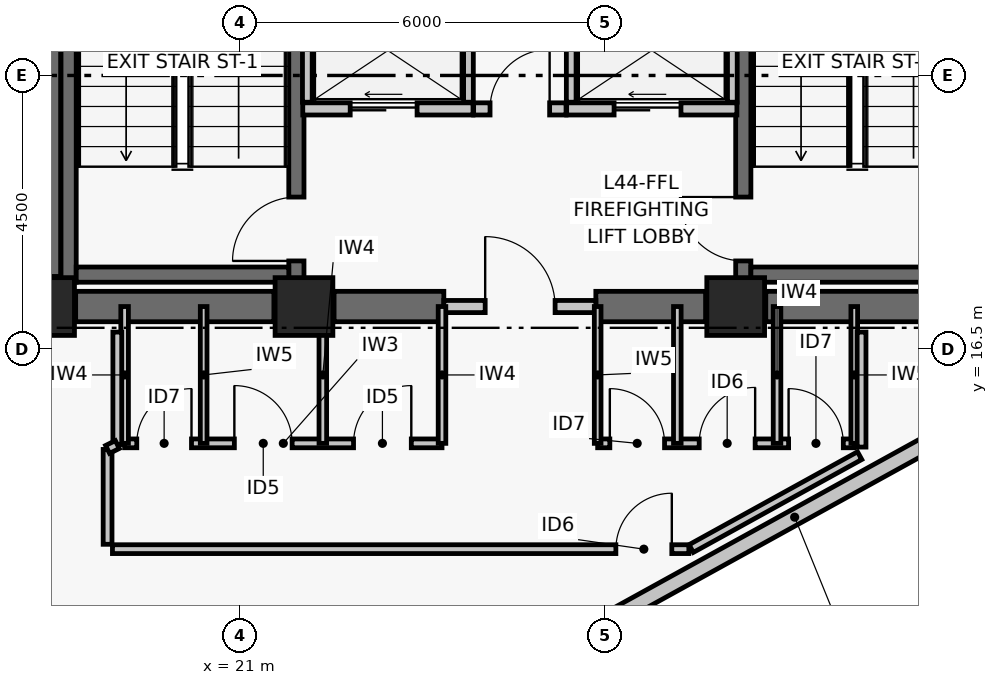
"""IFC4 building model, lengths in metres.
Left out: names, types, materials, properties, quantities, classifications, styles, units other than length and angle.
Written with IfcOpenShell. Run it as: python <this file> out.ifc"""

import sys

from ifc_helpers import new_model, si_unit, direction, frame, frame_2d, origin, origin_2d, place, context, subcontext, project, spatial, rectangle, extrude, element, fill, save


model = new_model("IFC4")
c1 = context("Model", 3, precision=1e-05, world=origin(), true_north=direction((0.0, 1.0)))
c2 = subcontext(c1, "Body", "Model", "MODEL_VIEW")
j1 = project(units=[si_unit("LENGTHUNIT", "METRE"), si_unit("PLANEANGLEUNIT", "RADIAN")], contexts=[c1])
p1 = place(None, origin())
s1 = spatial("IfcSite", under=j1, at=p1, CompositionType="ELEMENT")
p2 = place(p1, origin())
s2 = spatial("IfcBuilding", under=s1, at=p2, CompositionType="ELEMENT")
p3 = place(p2, frame((0.0, 0.0, 176.64)))
s3 = spatial("IfcBuildingStorey", under=s2, at=p3, CompositionType="ELEMENT", Elevation=176.64)
for number, where, z_axis, x_axis in (
    (1, (17.8, 17.2, 0.0), (0.0, 0.0, 1.0), (1.0, 0.0, 0.0)),
    (2, (22.05, 17.2, 0.0), (0.0, 0.0, 1.0), (1.0, 0.0, 0.0)),
    (3, (29.15, 17.2, 0.0), (0.0, 0.0, 1.0), (1.0, 0.0, 0.0)),
):
    element("IfcColumn", number, at=place(p3, frame(where, z_axis=z_axis, x_axis=x_axis)), inside=s3, PredefinedType="COLUMN", context=c2, shape_type="SweptSolid", body=[
        extrude(rectangle(XDim=0.95, YDim=0.95, at=origin_2d()), origin(), (0.0, 0.0, 1.0), 3.72),
    ])
p4 = place(p3, frame((18.295, 17.2, 0.0), z_axis=(0.0, 0.0, 1.0), x_axis=(1.0, 0.0, 0.0)))
e4 = element("IfcWall", 4, at=p4, inside=s3, PredefinedType="SHEAR", context=c2, shape_type="SweptSolid", body=[
    extrude(rectangle(XDim=3.26, YDim=0.5, at=frame_2d((1.63, 0.0))), origin(), (0.0, 0.0, 1.0), 3.5),
])
p5 = place(p3, frame((22.545, 17.2, 0.0), z_axis=(0.0, 0.0, 1.0), x_axis=(1.0, 0.0, 0.0)))
e5 = element("IfcWall", 5, at=p5, inside=s3, PredefinedType="SHEAR", context=c2, shape_type="SweptSolid", body=[
    extrude(rectangle(XDim=1.805, YDim=0.5, at=frame_2d((0.903, 0.0))), origin(), (0.0, 0.0, 1.0), 3.5),
])
p6 = place(p3, frame((26.85, 17.2, 0.0), z_axis=(0.0, 0.0, 1.0), x_axis=(1.0, 0.0, 0.0)))
e6 = element("IfcWall", 6, at=p6, inside=s3, PredefinedType="SHEAR", context=c2, shape_type="SweptSolid", body=[
    extrude(rectangle(XDim=1.805, YDim=0.5, at=frame_2d((0.902, 0.0))), origin(), (0.0, 0.0, 1.0), 3.5),
])
p7 = place(p3, frame((29.645, 17.2, 0.0), z_axis=(0.0, 0.0, 1.0), x_axis=(1.0, 0.0, 0.0)))
e7 = element("IfcWall", 7, at=p7, inside=s3, PredefinedType="SHEAR", context=c2, shape_type="SweptSolid", body=[
    extrude(rectangle(XDim=3.26, YDim=0.5, at=frame_2d((1.63, 0.0))), origin(), (0.0, 0.0, 1.0), 3.5),
])
p8 = place(p3, frame((17.8, 17.695, 0.0), z_axis=(0.0, 0.0, 1.0), x_axis=(0.0, 1.0, 0.0)))
e8 = element("IfcWall", 8, at=p8, inside=s3, PredefinedType="SHEAR", context=c2, shape_type="SweptSolid", body=[
    extrude(rectangle(XDim=8.61, YDim=0.5, at=frame_2d((4.305, 0.0))), origin(), (0.0, 0.0, 1.0), 3.5),
])
p9 = place(p3, frame((18.179, 17.6, 0.0), z_axis=(0.0, 0.0, 1.0), x_axis=(0.0, 1.0, 0.0)))
e9 = element("IfcWall", 9, at=p9, inside=s3, PredefinedType="SHEAR", context=c2, shape_type="SweptSolid", body=[
    extrude(rectangle(XDim=8.8, YDim=0.25, at=frame_2d((4.4, 0.0))), origin(), (0.0, 0.0, 1.0), 3.5),
])
p10 = place(p3, frame((21.925, 17.6, 0.0), z_axis=(0.0, 0.0, 1.0), x_axis=(0.0, 1.0, 0.0)))
e10 = element("IfcWall", 10, at=p10, inside=s3, PredefinedType="SHEAR", context=c2, shape_type="SweptSolid", body=[
    extrude(rectangle(XDim=8.8, YDim=0.25, at=frame_2d((4.4, 0.0))), origin(), (0.0, 0.0, 1.0), 3.5),
])
p11 = place(p10, frame((0.35, 0.0, 0.0)))
e11 = element("IfcOpeningElement", 11, at=p11, cuts=e10, PredefinedType="OPENING", context=c2, shape_type="SweptSolid", body=[
    extrude(rectangle(XDim=1.05, YDim=2.08, at=frame_2d((0.525, 1.04))), frame((0.0, 0.135, 0.0), z_axis=(0.0, -1.0, 0.0), x_axis=(1.0, 0.0, 0.0)), (0.0, 0.0, 1.0), 0.27),
])
p12 = place(p3, frame((18.304, 17.725, 0.0), z_axis=(0.0, 0.0, 1.0), x_axis=(1.0, 0.0, 0.0)))
e12 = element("IfcWall", 12, at=p12, inside=s3, PredefinedType="SHEAR", context=c2, shape_type="SweptSolid", body=[
    extrude(rectangle(XDim=3.496, YDim=0.25, at=frame_2d((1.748, 0.0))), origin(), (0.0, 0.0, 1.0), 3.5),
])
p13 = place(p3, frame((29.275, 17.6, 0.0), z_axis=(0.0, 0.0, 1.0), x_axis=(0.0, 1.0, 0.0)))
e13 = element("IfcWall", 13, at=p13, inside=s3, PredefinedType="SHEAR", context=c2, shape_type="SweptSolid", body=[
    extrude(rectangle(XDim=8.8, YDim=0.25, at=frame_2d((4.4, 0.0))), origin(), (0.0, 0.0, 1.0), 3.5),
])
p14 = place(p13, frame((0.35, 0.0, 0.0)))
e14 = element("IfcOpeningElement", 14, at=p14, cuts=e13, PredefinedType="OPENING", context=c2, shape_type="SweptSolid", body=[
    extrude(rectangle(XDim=1.05, YDim=2.08, at=frame_2d((0.525, 1.04))), frame((0.0, 0.135, 0.0), z_axis=(0.0, -1.0, 0.0), x_axis=(1.0, 0.0, 0.0)), (0.0, 0.0, 1.0), 0.27),
])
p15 = place(p3, frame((29.4, 17.725, 0.0), z_axis=(0.0, 0.0, 1.0), x_axis=(1.0, 0.0, 0.0)))
e15 = element("IfcWall", 15, at=p15, inside=s3, PredefinedType="SHEAR", context=c2, shape_type="SweptSolid", body=[
    extrude(rectangle(XDim=3.496, YDim=0.25, at=frame_2d((1.748, 0.0))), origin(), (0.0, 0.0, 1.0), 3.5),
])
p16 = place(p3, frame((33.195, 15.432, 0.0), z_axis=(0.0, 0.0, 1.0), x_axis=(-0.875663362897, -0.482922017389, 0.0)))
e16 = element("IfcWall", 16, at=p16, inside=s3, PredefinedType="PARTITIONING", context=c2, shape_type="SweptSolid", body=[
    extrude(rectangle(XDim=7.022, YDim=0.26, at=frame_2d((3.511, 0.0))), origin(), (0.0, 0.0, 1.0), 3.5),
])
p17 = place(p3, frame((24.35, 17.2, 0.0), z_axis=(0.0, 0.0, 1.0), x_axis=(1.0, 0.0, 0.0)))
e17 = element("IfcWall", 17, at=p17, inside=s3, PredefinedType="PARTITIONING", context=c2, shape_type="SweptSolid", body=[
    extrude(rectangle(XDim=2.5, YDim=0.2, at=frame_2d((1.25, 0.0))), origin(), (0.0, 0.0, 1.0), 2.63),
])
p18 = place(p17, frame((0.68, 0.0, 0.0)))
e18 = element("IfcOpeningElement", 18, at=p18, cuts=e17, PredefinedType="OPENING", context=c2, shape_type="SweptSolid", body=[
    extrude(rectangle(XDim=1.15, YDim=2.08, at=frame_2d((0.575, 1.04))), frame((0.0, 0.11, 0.0), z_axis=(0.0, -1.0, 0.0), x_axis=(1.0, 0.0, 0.0)), (0.0, 0.0, 1.0), 0.22),
])
p19 = place(p3, frame((24.84, 20.45, 0.0), z_axis=(0.0, 0.0, 1.0), x_axis=(1.0, 0.0, 0.0)))
e19 = element("IfcWall", 19, at=p19, inside=s3, PredefinedType="PARTITIONING", context=c2, shape_type="SweptSolid", body=[
    extrude(rectangle(XDim=1.52, YDim=0.2, at=frame_2d((0.76, 0.0))), origin(), (0.0, 0.0, 1.0), 3.5),
])
p20 = place(p19, frame((0.27, 0.0, 0.0)))
e20 = element("IfcOpeningElement", 20, at=p20, cuts=e19, PredefinedType="OPENING", context=c2, shape_type="SweptSolid", body=[
    extrude(rectangle(XDim=0.98, YDim=2.06, at=frame_2d((0.49, 1.03))), frame((0.0, 0.11, 0.0), z_axis=(0.0, -1.0, 0.0), x_axis=(1.0, 0.0, 0.0)), (0.0, 0.0, 1.0), 0.22),
])
p21 = place(p3, frame((22.03, 20.45, 0.0), z_axis=(0.0, 0.0, 1.0), x_axis=(1.0, 0.0, 0.0)))
e21 = element("IfcWall", 21, at=p21, inside=s3, PredefinedType="PARTITIONING", context=c2, shape_type="SweptSolid", body=[
    extrude(rectangle(XDim=2.8, YDim=0.2, at=frame_2d((1.4, 0.0))), origin(), (0.0, 0.0, 1.0), 3.5),
])
p22 = place(p21, frame((0.78, 0.0, 0.0)))
e22 = element("IfcOpeningElement", 22, at=p22, cuts=e21, PredefinedType="OPENING", context=c2, shape_type="SweptSolid", body=[
    extrude(rectangle(XDim=1.1, YDim=2.08, at=frame_2d((0.55, 1.04))), frame((0.0, 0.11, 0.0), z_axis=(0.0, -1.0, 0.0), x_axis=(1.0, 0.0, 0.0)), (0.0, 0.0, 1.0), 0.22),
])
p23 = place(p3, frame((26.37, 20.45, 0.0), z_axis=(0.0, 0.0, 1.0), x_axis=(1.0, 0.0, 0.0)))
e23 = element("IfcWall", 23, at=p23, inside=s3, PredefinedType="PARTITIONING", context=c2, shape_type="SweptSolid", body=[
    extrude(rectangle(XDim=2.8, YDim=0.2, at=frame_2d((1.4, 0.0))), origin(), (0.0, 0.0, 1.0), 3.5),
])
p24 = place(p23, frame((0.78, 0.0, 0.0)))
e24 = element("IfcOpeningElement", 24, at=p24, cuts=e23, PredefinedType="OPENING", context=c2, shape_type="SweptSolid", body=[
    extrude(rectangle(XDim=1.1, YDim=2.08, at=frame_2d((0.55, 1.04))), frame((0.0, 0.11, 0.0), z_axis=(0.0, -1.0, 0.0), x_axis=(1.0, 0.0, 0.0)), (0.0, 0.0, 1.0), 0.22),
])
for number, where, z_axis, x_axis in (
    (25, (22.105, 20.56, 0.0), (0.0, 0.0, 1.0), (0.0, 1.0, 0.0)),
    (26, (24.755, 20.56, 0.0), (0.0, 0.0, 1.0), (0.0, 1.0, 0.0)),
):
    element("IfcWall", number, at=place(p3, frame(where, z_axis=z_axis, x_axis=x_axis)), inside=s3, PredefinedType="PARTITIONING", context=c2, shape_type="SweptSolid", body=[
        extrude(rectangle(XDim=1.71, YDim=0.16, at=frame_2d((0.855, 0.0))), origin(), (0.0, 0.0, 1.0), 3.5),
    ])
p25 = place(p3, frame((29.095, 20.56, 0.0), z_axis=(0.0, 0.0, 1.0), x_axis=(0.0, 1.0, 0.0)))
e27 = element("IfcWall", 27, at=p25, inside=s3, PredefinedType="PARTITIONING", context=c2, shape_type="SweptSolid", body=[
    extrude(rectangle(XDim=5.45, YDim=0.16, at=frame_2d((2.725, 0.0))), origin(), (0.0, 0.0, 1.0), 3.5),
])
p26 = place(p3, frame((26.445, 20.56, 0.0), z_axis=(0.0, 0.0, 1.0), x_axis=(0.0, 1.0, 0.0)))
e28 = element("IfcWall", 28, at=p26, inside=s3, PredefinedType="PARTITIONING", context=c2, shape_type="SweptSolid", body=[
    extrude(rectangle(XDim=1.71, YDim=0.16, at=frame_2d((0.855, 0.0))), origin(), (0.0, 0.0, 1.0), 3.5),
])
p27 = place(p3, frame((19.1, 14.95, 0.0), z_axis=(0.0, 0.0, 1.0), x_axis=(1.0, 0.0, 0.0)))
e29 = element("IfcWall", 29, at=p27, inside=s3, PredefinedType="PARTITIONING", context=c2, shape_type="SweptSolid", body=[
    extrude(rectangle(XDim=5.22, YDim=0.145, at=frame_2d((2.61, 0.0))), origin(), (0.0, 0.0, 1.0), 2.73),
])
p28 = place(p27, frame((0.2, 0.0, 0.0)))
e30 = element("IfcOpeningElement", 30, at=p28, cuts=e29, PredefinedType="OPENING", context=c2, shape_type="SweptSolid", body=[
    extrude(rectangle(XDim=0.9, YDim=2.02, at=frame_2d((0.45, 1.01))), frame((0.0, 0.083, 0.0), z_axis=(0.0, -1.0, 0.0), x_axis=(1.0, 0.0, 0.0)), (0.0, 0.0, 1.0), 0.165),
])
p29 = place(p27, frame((1.805, 0.0, 0.0)))
e31 = element("IfcOpeningElement", 31, at=p29, cuts=e29, PredefinedType="OPENING", context=c2, shape_type="SweptSolid", body=[
    extrude(rectangle(XDim=0.95, YDim=2.06, at=frame_2d((0.475, 1.03))), frame((0.0, 0.083, 0.0), z_axis=(0.0, -1.0, 0.0), x_axis=(1.0, 0.0, 0.0)), (0.0, 0.0, 1.0), 0.165),
])
p30 = place(p27, frame((3.765, 0.0, 0.0)))
e32 = element("IfcOpeningElement", 32, at=p30, cuts=e29, PredefinedType="OPENING", context=c2, shape_type="SweptSolid", body=[
    extrude(rectangle(XDim=0.95, YDim=2.06, at=frame_2d((0.475, 1.03))), frame((0.0, 0.083, 0.0), z_axis=(0.0, -1.0, 0.0), x_axis=(1.0, 0.0, 0.0)), (0.0, 0.0, 1.0), 0.165),
])
p31 = place(p3, frame((26.88, 14.95, 0.0), z_axis=(0.0, 0.0, 1.0), x_axis=(1.0, 0.0, 0.0)))
e33 = element("IfcWall", 33, at=p31, inside=s3, PredefinedType="PARTITIONING", context=c2, shape_type="SweptSolid", body=[
    extrude(rectangle(XDim=4.22, YDim=0.145, at=frame_2d((2.11, 0.0))), origin(), (0.0, 0.0, 1.0), 2.93),
])
p32 = place(p31, frame((0.2, 0.0, 0.0)))
e34 = element("IfcOpeningElement", 34, at=p32, cuts=e33, PredefinedType="OPENING", context=c2, shape_type="SweptSolid", body=[
    extrude(rectangle(XDim=0.9, YDim=2.02, at=frame_2d((0.45, 1.01))), frame((0.0, 0.083, 0.0), z_axis=(0.0, -1.0, 0.0), x_axis=(1.0, 0.0, 0.0)), (0.0, 0.0, 1.0), 0.165),
])
p33 = place(p31, frame((1.67, 0.0, 0.0)))
e35 = element("IfcOpeningElement", 35, at=p33, cuts=e33, PredefinedType="OPENING", context=c2, shape_type="SweptSolid", body=[
    extrude(rectangle(XDim=0.92, YDim=2.05, at=frame_2d((0.46, 1.025))), frame((0.0, 0.083, 0.0), z_axis=(0.0, -1.0, 0.0), x_axis=(1.0, 0.0, 0.0)), (0.0, 0.0, 1.0), 0.165),
])
p34 = place(p31, frame((3.14, 0.0, 0.0)))
e36 = element("IfcOpeningElement", 36, at=p34, cuts=e33, PredefinedType="OPENING", context=c2, shape_type="SweptSolid", body=[
    extrude(rectangle(XDim=0.9, YDim=2.02, at=frame_2d((0.45, 1.01))), frame((0.0, 0.083, 0.0), z_axis=(0.0, -1.0, 0.0), x_axis=(1.0, 0.0, 0.0)), (0.0, 0.0, 1.0), 0.165),
])
p35 = place(p3, frame((19.1, 14.95, 0.0), z_axis=(0.0, 0.0, 1.0), x_axis=(0.0, 1.0, 0.0)))
e37 = element("IfcWall", 37, at=p35, inside=s3, PredefinedType="PARTITIONING", context=c2, shape_type="SweptSolid", body=[
    extrude(rectangle(XDim=2.25, YDim=0.125, at=frame_2d((1.125, 0.0))), origin(), (0.0, 0.0, 1.0), 2.63),
])
p36 = place(p3, frame((20.4, 14.95, 0.0), z_axis=(0.0, 0.0, 1.0), x_axis=(0.0, 1.0, 0.0)))
e38 = element("IfcWall", 38, at=p36, inside=s3, PredefinedType="PARTITIONING", context=c2, shape_type="SweptSolid", body=[
    extrude(rectangle(XDim=2.25, YDim=0.11, at=frame_2d((1.125, 0.0))), origin(), (0.0, 0.0, 1.0), 2.63),
])
for number, where, z_axis, x_axis in (
    (39, (22.36, 14.95, 0.0), (0.0, 0.0, 1.0), (0.0, 1.0, 0.0)),
    (40, (24.32, 14.95, 0.0), (0.0, 0.0, 1.0), (0.0, 1.0, 0.0)),
):
    element("IfcWall", number, at=place(p3, frame(where, z_axis=z_axis, x_axis=x_axis)), inside=s3, PredefinedType="PARTITIONING", context=c2, shape_type="SweptSolid", body=[
        extrude(rectangle(XDim=2.25, YDim=0.125, at=frame_2d((1.125, 0.0))), origin(), (0.0, 0.0, 1.0), 2.63),
    ])
p37 = place(p3, frame((26.88, 14.95, 0.0), z_axis=(0.0, 0.0, 1.0), x_axis=(0.0, 1.0, 0.0)))
e41 = element("IfcWall", 41, at=p37, inside=s3, PredefinedType="PARTITIONING", context=c2, shape_type="SweptSolid", body=[
    extrude(rectangle(XDim=2.25, YDim=0.11, at=frame_2d((1.125, 0.0))), origin(), (0.0, 0.0, 1.0), 2.63),
])
for number, where, z_axis, x_axis in (
    (42, (28.19, 14.95, 0.0), (0.0, 0.0, 1.0), (0.0, 1.0, 0.0)),
    (43, (29.83, 14.95, 0.0), (0.0, 0.0, 1.0), (0.0, 1.0, 0.0)),
):
    element("IfcWall", number, at=place(p3, frame(where, z_axis=z_axis, x_axis=x_axis)), inside=s3, PredefinedType="PARTITIONING", context=c2, shape_type="SweptSolid", body=[
        extrude(rectangle(XDim=2.25, YDim=0.125, at=frame_2d((1.125, 0.0))), origin(), (0.0, 0.0, 1.0), 2.63),
    ])
p38 = place(p3, frame((31.1, 14.95, 0.0), z_axis=(0.0, 0.0, 1.0), x_axis=(0.0, 1.0, 0.0)))
e44 = element("IfcWall", 44, at=p38, inside=s3, PredefinedType="PARTITIONING", context=c2, shape_type="SweptSolid", body=[
    extrude(rectangle(XDim=2.25, YDim=0.11, at=frame_2d((1.125, 0.0))), origin(), (0.0, 0.0, 1.0), 2.63),
])
p39 = place(p3, frame((18.98, 16.78, 0.0), z_axis=(0.0, 0.0, 1.0), x_axis=(0.0, -1.0, 0.0)))
e45 = element("IfcWall", 45, at=p39, inside=s3, PredefinedType="PARTITIONING", context=c2, shape_type="SweptSolid", body=[
    extrude(rectangle(XDim=1.85, YDim=0.145, at=frame_2d((0.925, 0.0))), origin(), (0.0, 0.0, 1.0), 2.63),
])
p40 = place(p3, frame((18.82, 14.85, 0.0), z_axis=(0.0, 0.0, 1.0), x_axis=(0.0, -1.0, 0.0)))
e46 = element("IfcWall", 46, at=p40, inside=s3, PredefinedType="PARTITIONING", context=c2, shape_type="SweptSolid", body=[
    extrude(rectangle(XDim=1.56, YDim=0.145, at=frame_2d((0.78, 0.0))), origin(), (0.0, 0.0, 1.0), 3.08),
])
p41 = place(p3, frame((18.9, 13.21, 0.0), z_axis=(0.0, 0.0, 1.0), x_axis=(1.0, 0.0, 0.0)))
e47 = element("IfcWall", 47, at=p41, inside=s3, PredefinedType="PARTITIONING", context=c2, shape_type="SweptSolid", body=[
    extrude(rectangle(XDim=9.479, YDim=0.145, at=frame_2d((4.74, 0.0))), origin(), (0.0, 0.0, 1.0), 2.73),
])
p42 = place(p41, frame((8.279, 0.0, 0.0)))
e48 = element("IfcOpeningElement", 48, at=p42, cuts=e47, PredefinedType="OPENING", context=c2, shape_type="SweptSolid", body=[
    extrude(rectangle(XDim=0.92, YDim=2.05, at=frame_2d((0.46, 1.025))), frame((0.0, 0.083, 0.0), z_axis=(0.0, -1.0, 0.0), x_axis=(1.0, 0.0, 0.0)), (0.0, 0.0, 1.0), 0.165),
])
p43 = place(p3, frame((28.418, 13.22, 0.0), z_axis=(0.0, 0.0, 1.0), x_axis=(0.875692450227, 0.48286927073, 0.0)))
e49 = element("IfcWall", 49, at=p43, inside=s3, PredefinedType="PARTITIONING", context=c2, shape_type="SweptSolid", body=[
    extrude(rectangle(XDim=3.164, YDim=0.145, at=frame_2d((1.582, 0.0))), origin(), (0.0, 0.0, 1.0), 3.5),
])
p44 = place(p3, frame((31.22, 14.889, 0.0), z_axis=(0.0, 0.0, 1.0), x_axis=(0.0, 1.0, 0.0)))
e50 = element("IfcWall", 50, at=p44, inside=s3, PredefinedType="PARTITIONING", context=c2, shape_type="SweptSolid", body=[
    extrude(rectangle(XDim=1.891, YDim=0.145, at=frame_2d((0.946, 0.0))), origin(), (0.0, 0.0, 1.0), 2.63),
])
p45 = place(p3, frame((18.82, 14.85, 0.0), z_axis=(0.0, 0.0, 1.0), x_axis=(0.89470021502, 0.446667130247, 0.0)))
e51 = element("IfcWall", 51, at=p45, inside=s3, PredefinedType="PARTITIONING", context=c2, shape_type="SweptSolid", body=[
    extrude(rectangle(XDim=0.179, YDim=0.145, at=frame_2d((0.089, 0.0))), origin(), (0.0, 0.0, 1.0), 3.5),
])
p46 = place(p11, origin())
e52 = element("IfcDoor", 52, at=p46, inside=s3, OperationType="SINGLE_SWING_LEFT", PredefinedType="DOOR", context=c2, shape_type="SweptSolid", body=[
    extrude(rectangle(XDim=1.05, YDim=2.08, at=frame_2d((0.525, 1.04))), frame((0.0, 0.025, 0.0), z_axis=(0.0, -1.0, 0.0), x_axis=(1.0, 0.0, 0.0)), (0.0, 0.0, 1.0), 0.05),
])
fill(e11, e52)
p47 = place(p14, origin())
e53 = element("IfcDoor", 53, at=p47, inside=s3, OperationType="SINGLE_SWING_RIGHT", PredefinedType="DOOR", context=c2, shape_type="SweptSolid", body=[
    extrude(rectangle(XDim=1.05, YDim=2.08, at=frame_2d((0.525, 1.04))), frame((0.0, 0.025, 0.0), z_axis=(0.0, -1.0, 0.0), x_axis=(1.0, 0.0, 0.0)), (0.0, 0.0, 1.0), 0.05),
])
fill(e14, e53)
p48 = place(p18, origin())
e54 = element("IfcDoor", 54, at=p48, inside=s3, OperationType="SINGLE_SWING_LEFT", PredefinedType="DOOR", context=c2, shape_type="SweptSolid", body=[
    extrude(rectangle(XDim=1.15, YDim=2.08, at=frame_2d((0.575, 1.04))), frame((0.0, 0.025, 0.0), z_axis=(0.0, -1.0, 0.0), x_axis=(1.0, 0.0, 0.0)), (0.0, 0.0, 1.0), 0.05),
])
fill(e18, e54)
p49 = place(p20, origin())
e55 = element("IfcDoor", 55, at=p49, inside=s3, OperationType="SINGLE_SWING_RIGHT", PredefinedType="DOOR", context=c2, shape_type="SweptSolid", body=[
    extrude(rectangle(XDim=0.98, YDim=2.06, at=frame_2d((0.49, 1.03))), frame((0.0, 0.025, 0.0), z_axis=(0.0, -1.0, 0.0), x_axis=(1.0, 0.0, 0.0)), (0.0, 0.0, 1.0), 0.05),
])
fill(e20, e55)
p50 = place(p22, origin())
e56 = element("IfcDoor", 56, at=p50, inside=s3, OperationType="DOUBLE_DOOR_SLIDING", PredefinedType="DOOR", context=c2, shape_type="SweptSolid", body=[
    extrude(rectangle(XDim=1.1, YDim=2.08, at=frame_2d((0.55, 1.04))), frame((0.0, 0.025, 0.0), z_axis=(0.0, -1.0, 0.0), x_axis=(1.0, 0.0, 0.0)), (0.0, 0.0, 1.0), 0.05),
])
fill(e22, e56)
p51 = place(p24, origin())
e57 = element("IfcDoor", 57, at=p51, inside=s3, OperationType="DOUBLE_DOOR_SLIDING", PredefinedType="DOOR", context=c2, shape_type="SweptSolid", body=[
    extrude(rectangle(XDim=1.1, YDim=2.08, at=frame_2d((0.55, 1.04))), frame((0.0, 0.025, 0.0), z_axis=(0.0, -1.0, 0.0), x_axis=(1.0, 0.0, 0.0)), (0.0, 0.0, 1.0), 0.05),
])
fill(e24, e57)
p52 = place(p28, origin())
e58 = element("IfcDoor", 58, at=p52, inside=s3, OperationType="SINGLE_SWING_RIGHT", PredefinedType="DOOR", context=c2, shape_type="SweptSolid", body=[
    extrude(rectangle(XDim=0.9, YDim=2.02, at=frame_2d((0.45, 1.01))), frame((0.0, 0.025, 0.0), z_axis=(0.0, -1.0, 0.0), x_axis=(1.0, 0.0, 0.0)), (0.0, 0.0, 1.0), 0.05),
])
fill(e30, e58)
p53 = place(p29, origin())
e59 = element("IfcDoor", 59, at=p53, inside=s3, OperationType="SINGLE_SWING_LEFT", PredefinedType="DOOR", context=c2, shape_type="SweptSolid", body=[
    extrude(rectangle(XDim=0.95, YDim=2.06, at=frame_2d((0.475, 1.03))), frame((0.0, 0.025, 0.0), z_axis=(0.0, -1.0, 0.0), x_axis=(1.0, 0.0, 0.0)), (0.0, 0.0, 1.0), 0.05),
])
fill(e31, e59)
p54 = place(p30, origin())
e60 = element("IfcDoor", 60, at=p54, inside=s3, OperationType="SINGLE_SWING_RIGHT", PredefinedType="DOOR", context=c2, shape_type="SweptSolid", body=[
    extrude(rectangle(XDim=0.95, YDim=2.06, at=frame_2d((0.475, 1.03))), frame((0.0, 0.025, 0.0), z_axis=(0.0, -1.0, 0.0), x_axis=(1.0, 0.0, 0.0)), (0.0, 0.0, 1.0), 0.05),
])
fill(e32, e60)
p55 = place(p32, origin())
e61 = element("IfcDoor", 61, at=p55, inside=s3, OperationType="SINGLE_SWING_LEFT", PredefinedType="DOOR", context=c2, shape_type="SweptSolid", body=[
    extrude(rectangle(XDim=0.9, YDim=2.02, at=frame_2d((0.45, 1.01))), frame((0.0, 0.025, 0.0), z_axis=(0.0, -1.0, 0.0), x_axis=(1.0, 0.0, 0.0)), (0.0, 0.0, 1.0), 0.05),
])
fill(e34, e61)
p56 = place(p33, origin())
e62 = element("IfcDoor", 62, at=p56, inside=s3, OperationType="SINGLE_SWING_RIGHT", PredefinedType="DOOR", context=c2, shape_type="SweptSolid", body=[
    extrude(rectangle(XDim=0.92, YDim=2.05, at=frame_2d((0.46, 1.025))), frame((0.0, 0.025, 0.0), z_axis=(0.0, -1.0, 0.0), x_axis=(1.0, 0.0, 0.0)), (0.0, 0.0, 1.0), 0.05),
])
fill(e35, e62)
p57 = place(p34, origin())
e63 = element("IfcDoor", 63, at=p57, inside=s3, OperationType="SINGLE_SWING_LEFT", PredefinedType="DOOR", context=c2, shape_type="SweptSolid", body=[
    extrude(rectangle(XDim=0.9, YDim=2.02, at=frame_2d((0.45, 1.01))), frame((0.0, 0.025, 0.0), z_axis=(0.0, -1.0, 0.0), x_axis=(1.0, 0.0, 0.0)), (0.0, 0.0, 1.0), 0.05),
])
fill(e36, e63)
p58 = place(p42, origin())
e64 = element("IfcDoor", 64, at=p58, inside=s3, OperationType="SINGLE_SWING_RIGHT", PredefinedType="DOOR", context=c2, shape_type="SweptSolid", body=[
    extrude(rectangle(XDim=0.92, YDim=2.05, at=frame_2d((0.46, 1.025))), frame((0.0, 0.025, 0.0), z_axis=(0.0, -1.0, 0.0), x_axis=(1.0, 0.0, 0.0)), (0.0, 0.0, 1.0), 0.05),
])
fill(e48, e64)
save(model, sys.argv[1])
